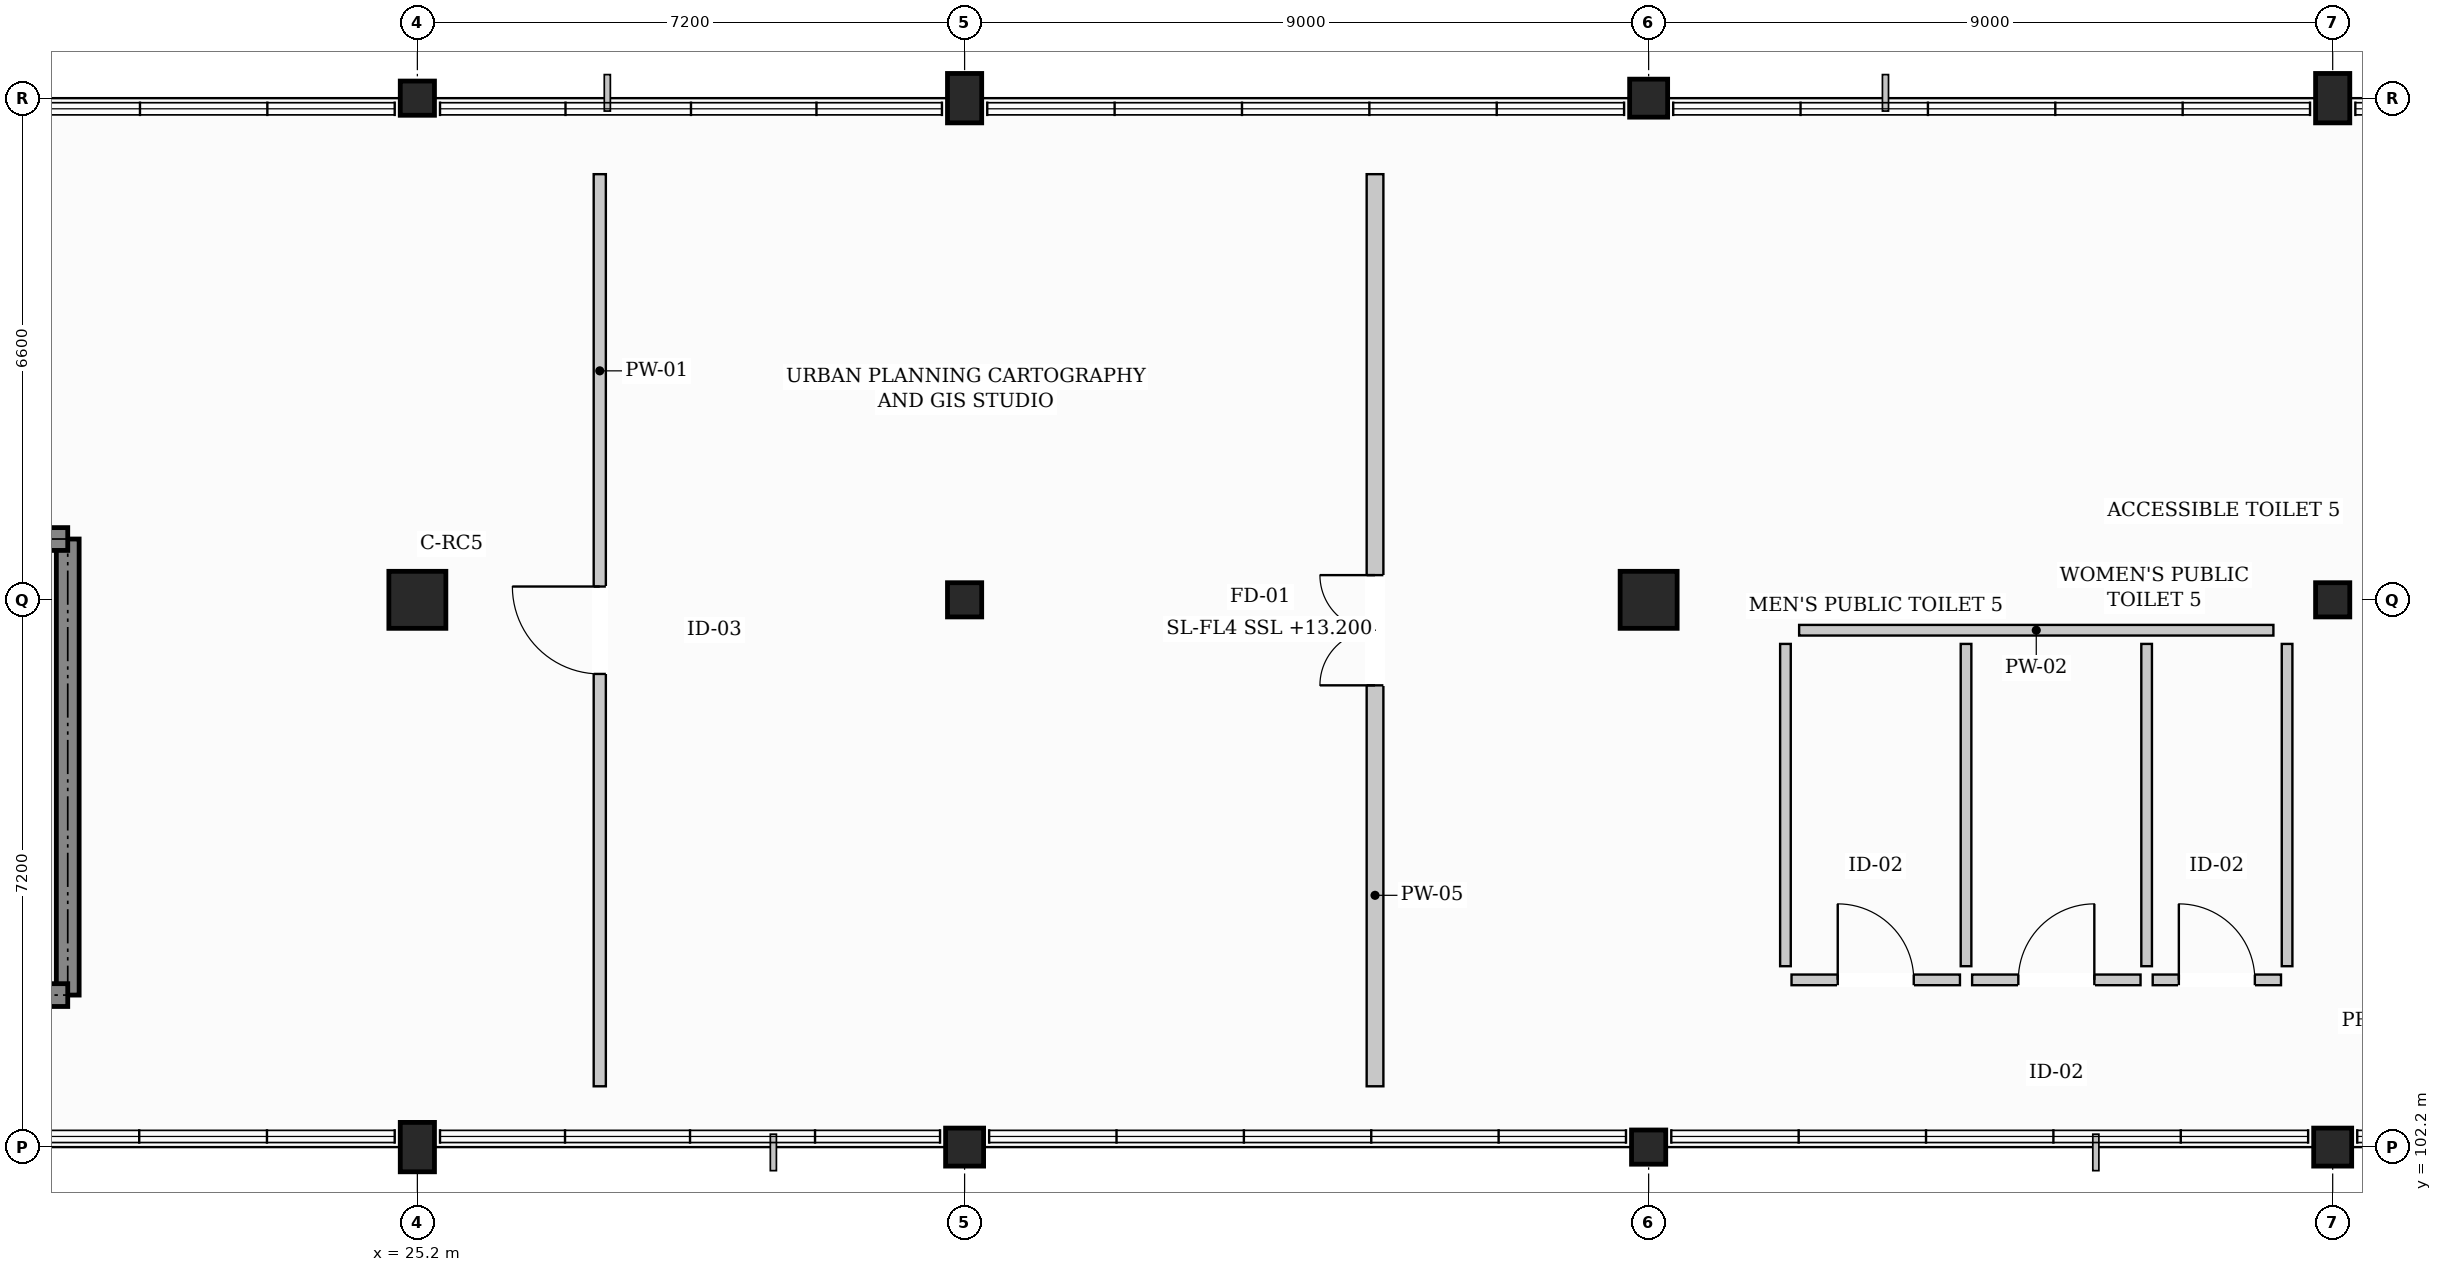
"""IFC4 building model, lengths in metres.
Left out: names, types, materials, properties, quantities, classifications, styles, units other than length and angle.
Written with IfcOpenShell. Run it as: python <this file> out.ifc"""

import sys

from ifc_helpers import new_model, si_unit, direction, frame, frame_2d, origin, origin_2d, place, context, subcontext, project, spatial, rectangle, extrude, element, fill, save


model = new_model("IFC4")
c1 = context("Model", 3, precision=1e-05, world=origin(), true_north=direction((0.0, 1.0)))
c2 = subcontext(c1, "Body", "Model", "MODEL_VIEW")
j1 = project(units=[si_unit("LENGTHUNIT", "METRE"), si_unit("PLANEANGLEUNIT", "RADIAN")], contexts=[c1])
p1 = place(None, origin())
s1 = spatial("IfcSite", under=j1, at=p1, CompositionType="ELEMENT")
p2 = place(p1, origin())
s2 = spatial("IfcBuilding", under=s1, at=p2, CompositionType="ELEMENT")
p3 = place(p2, frame((0.0, 0.0, 13.2)))
s3 = spatial("IfcBuildingStorey", under=s2, at=p3, CompositionType="ELEMENT", Elevation=13.2)
p4 = place(p3, frame((25.2, 102.2, 0.0), z_axis=(0.0, 0.0, 1.0), x_axis=(1.0, 0.0, 0.0)))
e1 = element("IfcColumn", 1, at=p4, inside=s3, PredefinedType="COLUMN", context=c2, shape_type="SweptSolid", body=[
    extrude(rectangle(XDim=0.45, YDim=0.65, at=origin_2d()), origin(), (0.0, 0.0, 1.0), 3.6),
])
p5 = place(p3, frame((25.2, 109.4, 0.0), z_axis=(0.0, 0.0, 1.0), x_axis=(1.0, 0.0, 0.0)))
e2 = element("IfcColumn", 2, at=p5, inside=s3, PredefinedType="COLUMN", context=c2, shape_type="SweptSolid", body=[
    extrude(rectangle(XDim=0.75, YDim=0.75, at=origin_2d()), origin(), (0.0, 0.0, 1.0), 3.6),
])
p6 = place(p3, frame((25.2, 116.0, 0.0), z_axis=(0.0, 0.0, 1.0), x_axis=(1.0, 0.0, 0.0)))
e3 = element("IfcColumn", 3, at=p6, inside=s3, PredefinedType="COLUMN", context=c2, shape_type="SweptSolid", body=[
    extrude(rectangle(XDim=0.45, YDim=0.45, at=origin_2d()), origin(), (0.0, 0.0, 1.0), 3.6),
])
p7 = place(p3, frame((32.4, 102.2, 0.0), z_axis=(0.0, 0.0, 1.0), x_axis=(1.0, 0.0, 0.0)))
e4 = element("IfcColumn", 4, at=p7, inside=s3, PredefinedType="COLUMN", context=c2, shape_type="SweptSolid", body=[
    extrude(rectangle(XDim=0.5, YDim=0.5, at=origin_2d()), origin(), (0.0, 0.0, 1.0), 3.6),
])
p8 = place(p3, frame((32.4, 109.4, 0.0), z_axis=(0.0, 0.0, 1.0), x_axis=(1.0, 0.0, 0.0)))
e5 = element("IfcColumn", 5, at=p8, inside=s3, PredefinedType="COLUMN", context=c2, shape_type="SweptSolid", body=[
    extrude(rectangle(XDim=0.45, YDim=0.45, at=origin_2d()), origin(), (0.0, 0.0, 1.0), 3.6),
])
p9 = place(p3, frame((32.4, 116.0, 0.0), z_axis=(0.0, 0.0, 1.0), x_axis=(1.0, 0.0, 0.0)))
e6 = element("IfcColumn", 6, at=p9, inside=s3, PredefinedType="COLUMN", context=c2, shape_type="SweptSolid", body=[
    extrude(rectangle(XDim=0.45, YDim=0.65, at=origin_2d()), origin(), (0.0, 0.0, 1.0), 3.6),
])
p10 = place(p3, frame((41.4, 102.2, 0.0), z_axis=(0.0, 0.0, 1.0), x_axis=(1.0, 0.0, 0.0)))
e7 = element("IfcColumn", 7, at=p10, inside=s3, PredefinedType="COLUMN", context=c2, shape_type="SweptSolid", body=[
    extrude(rectangle(XDim=0.45, YDim=0.45, at=origin_2d()), origin(), (0.0, 0.0, 1.0), 3.6),
])
p11 = place(p3, frame((41.4, 109.4, 0.0), z_axis=(0.0, 0.0, 1.0), x_axis=(1.0, 0.0, 0.0)))
e8 = element("IfcColumn", 8, at=p11, inside=s3, PredefinedType="COLUMN", context=c2, shape_type="SweptSolid", body=[
    extrude(rectangle(XDim=0.75, YDim=0.75, at=origin_2d()), origin(), (0.0, 0.0, 1.0), 3.6),
])
for number, where, z_axis, x_axis in (
    (9, (41.4, 116.0, 0.0), (0.0, 0.0, 1.0), (1.0, 0.0, 0.0)),
    (10, (50.4, 102.2, 0.0), (0.0, 0.0, 1.0), (1.0, 0.0, 0.0)),
):
    element("IfcColumn", number, at=place(p3, frame(where, z_axis=z_axis, x_axis=x_axis)), inside=s3, PredefinedType="COLUMN", context=c2, shape_type="SweptSolid", body=[
        extrude(rectangle(XDim=0.5, YDim=0.5, at=origin_2d()), origin(), (0.0, 0.0, 1.0), 3.6),
    ])
p12 = place(p3, frame((50.4, 109.4, 0.0), z_axis=(0.0, 0.0, 1.0), x_axis=(1.0, 0.0, 0.0)))
e11 = element("IfcColumn", 11, at=p12, inside=s3, PredefinedType="COLUMN", context=c2, shape_type="SweptSolid", body=[
    extrude(rectangle(XDim=0.45, YDim=0.45, at=origin_2d()), origin(), (0.0, 0.0, 1.0), 3.6),
])
p13 = place(p3, frame((50.4, 116.0, 0.0), z_axis=(0.0, 0.0, 1.0), x_axis=(1.0, 0.0, 0.0)))
e12 = element("IfcColumn", 12, at=p13, inside=s3, PredefinedType="COLUMN", context=c2, shape_type="SweptSolid", body=[
    extrude(rectangle(XDim=0.45, YDim=0.65, at=origin_2d()), origin(), (0.0, 0.0, 1.0), 3.6),
])
p14 = place(p3, frame((20.6, 104.2, 0.0), z_axis=(0.0, 0.0, 1.0), x_axis=(0.0, 1.0, 0.0)))
e13 = element("IfcWall", 13, at=p14, inside=s3, PredefinedType="SHEAR", context=c2, shape_type="SweptSolid", body=[
    extrude(rectangle(XDim=6.0, YDim=0.3, at=frame_2d((3.0, 0.0))), origin(), (0.0, 0.0, 1.0), 3.3),
])
for number, where, z_axis, x_axis in (
    (14, (13.6, 104.2, 0.0), (0.0, 0.0, 1.0), (1.0, 0.0, 0.0)),
    (15, (13.6, 110.2, 0.0), (0.0, 0.0, 1.0), (1.0, 0.0, 0.0)),
):
    element("IfcWall", number, at=place(p3, frame(where, z_axis=z_axis, x_axis=x_axis)), inside=s3, PredefinedType="SHEAR", context=c2, shape_type="SweptSolid", body=[
        extrude(rectangle(XDim=7.0, YDim=0.3, at=frame_2d((3.5, 0.0))), origin(), (0.0, 0.0, 1.0), 3.3),
    ])
p15 = place(p3, frame((43.38, 109.0, 0.0), z_axis=(0.0, 0.0, 1.0), x_axis=(1.0, 0.0, 0.0)))
e16 = element("IfcWall", 16, at=p15, inside=s3, PredefinedType="PARTITIONING", context=c2, shape_type="SweptSolid", body=[
    extrude(rectangle(XDim=6.24, YDim=0.14, at=frame_2d((3.12, 0.0))), origin(), (0.0, 0.0, 1.0), 2.94),
])
for number, where, z_axis, x_axis in (
    (17, (43.2, 104.58, 0.0), (0.0, 0.0, 1.0), (0.0, 1.0, 0.0)),
    (18, (49.8, 104.58, 0.0), (0.0, 0.0, 1.0), (0.0, 1.0, 0.0)),
    (19, (45.576, 104.58, 0.0), (0.0, 0.0, 1.0), (0.0, 1.0, 0.0)),
    (20, (47.952, 104.58, 0.0), (0.0, 0.0, 1.0), (0.0, 1.0, 0.0)),
):
    element("IfcWall", number, at=place(p3, frame(where, z_axis=z_axis, x_axis=x_axis)), inside=s3, PredefinedType="PARTITIONING", context=c2, shape_type="SweptSolid", body=[
        extrude(rectangle(XDim=4.24, YDim=0.14, at=frame_2d((2.12, 0.0))), origin(), (0.0, 0.0, 1.0), 3.3),
    ])
p16 = place(p3, frame((43.28, 104.4, 0.0), z_axis=(0.0, 0.0, 1.0), x_axis=(1.0, 0.0, 0.0)))
e21 = element("IfcWall", 21, at=p16, inside=s3, PredefinedType="PARTITIONING", context=c2, shape_type="SweptSolid", body=[
    extrude(rectangle(XDim=2.216, YDim=0.14, at=frame_2d((1.108, 0.0))), origin(), (0.0, 0.0, 1.0), 3.3),
])
p17 = place(p16, frame((0.608, 0.0, 0.0)))
e22 = element("IfcOpeningElement", 22, at=p17, cuts=e21, PredefinedType="OPENING", context=c2, shape_type="SweptSolid", body=[
    extrude(rectangle(XDim=1.0, YDim=2.15, at=frame_2d((0.5, 1.075))), frame((0.0, 0.08, 0.0), z_axis=(0.0, -1.0, 0.0), x_axis=(1.0, 0.0, 0.0)), (0.0, 0.0, 1.0), 0.16),
])
p18 = place(p3, frame((45.656, 104.4, 0.0), z_axis=(0.0, 0.0, 1.0), x_axis=(1.0, 0.0, 0.0)))
e23 = element("IfcWall", 23, at=p18, inside=s3, PredefinedType="PARTITIONING", context=c2, shape_type="SweptSolid", body=[
    extrude(rectangle(XDim=2.216, YDim=0.14, at=frame_2d((1.108, 0.0))), origin(), (0.0, 0.0, 1.0), 2.94),
])
p19 = place(p18, frame((0.608, 0.0, 0.0)))
e24 = element("IfcOpeningElement", 24, at=p19, cuts=e23, PredefinedType="OPENING", context=c2, shape_type="SweptSolid", body=[
    extrude(rectangle(XDim=1.0, YDim=2.15, at=frame_2d((0.5, 1.075))), frame((0.0, 0.08, 0.0), z_axis=(0.0, -1.0, 0.0), x_axis=(1.0, 0.0, 0.0)), (0.0, 0.0, 1.0), 0.16),
])
p20 = place(p3, frame((48.032, 104.4, 0.0), z_axis=(0.0, 0.0, 1.0), x_axis=(1.0, 0.0, 0.0)))
e25 = element("IfcWall", 25, at=p20, inside=s3, PredefinedType="PARTITIONING", context=c2, shape_type="SweptSolid", body=[
    extrude(rectangle(XDim=1.688, YDim=0.14, at=frame_2d((0.844, 0.0))), origin(), (0.0, 0.0, 1.0), 3.3),
])
p21 = place(p20, frame((0.344, 0.0, 0.0)))
e26 = element("IfcOpeningElement", 26, at=p21, cuts=e25, PredefinedType="OPENING", context=c2, shape_type="SweptSolid", body=[
    extrude(rectangle(XDim=1.0, YDim=2.15, at=frame_2d((0.5, 1.075))), frame((0.0, 0.08, 0.0), z_axis=(0.0, -1.0, 0.0), x_axis=(1.0, 0.0, 0.0)), (0.0, 0.0, 1.0), 0.16),
])
p22 = place(p3, frame((37.8, 103.0, 0.0), z_axis=(0.0, 0.0, 1.0), x_axis=(0.0, 1.0, 0.0)))
e27 = element("IfcWall", 27, at=p22, inside=s3, PredefinedType="PARTITIONING", context=c2, shape_type="SweptSolid", body=[
    extrude(rectangle(XDim=12.0, YDim=0.22, at=frame_2d((6.0, 0.0))), origin(), (0.0, 0.0, 1.0), 2.86),
])
p23 = place(p22, frame((5.275, 0.0, 0.0)))
e28 = element("IfcOpeningElement", 28, at=p23, cuts=e27, PredefinedType="OPENING", context=c2, shape_type="SweptSolid", body=[
    extrude(rectangle(XDim=1.45, YDim=2.2, at=frame_2d((0.725, 1.1))), frame((0.0, 0.12, 0.0), z_axis=(0.0, -1.0, 0.0), x_axis=(1.0, 0.0, 0.0)), (0.0, 0.0, 1.0), 0.24),
])
p24 = place(p3, frame((27.6, 103.0, 0.0), z_axis=(0.0, 0.0, 1.0), x_axis=(0.0, 1.0, 0.0)))
e29 = element("IfcWall", 29, at=p24, inside=s3, PredefinedType="PARTITIONING", context=c2, shape_type="SweptSolid", body=[
    extrude(rectangle(XDim=12.0, YDim=0.16, at=frame_2d((6.0, 0.0))), origin(), (0.0, 0.0, 1.0), 2.9),
])
p25 = place(p24, frame((5.425, 0.0, 0.0)))
e30 = element("IfcOpeningElement", 30, at=p25, cuts=e29, PredefinedType="OPENING", context=c2, shape_type="SweptSolid", body=[
    extrude(rectangle(XDim=1.15, YDim=2.2, at=frame_2d((0.575, 1.1))), frame((0.0, 0.09, 0.0), z_axis=(0.0, -1.0, 0.0), x_axis=(1.0, 0.0, 0.0)), (0.0, 0.0, 1.0), 0.18),
])
p26 = place(p17, origin())
e31 = element("IfcDoor", 31, at=p26, inside=s3, OperationType="SINGLE_SWING_LEFT", PredefinedType="DOOR", context=c2, shape_type="SweptSolid", body=[
    extrude(rectangle(XDim=1.0, YDim=2.15, at=frame_2d((0.5, 1.075))), frame((0.0, 0.025, 0.0), z_axis=(0.0, -1.0, 0.0), x_axis=(1.0, 0.0, 0.0)), (0.0, 0.0, 1.0), 0.05),
])
fill(e22, e31)
p27 = place(p19, origin())
e32 = element("IfcDoor", 32, at=p27, inside=s3, OperationType="SINGLE_SWING_RIGHT", PredefinedType="DOOR", context=c2, shape_type="SweptSolid", body=[
    extrude(rectangle(XDim=1.0, YDim=2.15, at=frame_2d((0.5, 1.075))), frame((0.0, 0.025, 0.0), z_axis=(0.0, -1.0, 0.0), x_axis=(1.0, 0.0, 0.0)), (0.0, 0.0, 1.0), 0.05),
])
fill(e24, e32)
p28 = place(p21, origin())
e33 = element("IfcDoor", 33, at=p28, inside=s3, OperationType="SINGLE_SWING_LEFT", PredefinedType="DOOR", context=c2, shape_type="SweptSolid", body=[
    extrude(rectangle(XDim=1.0, YDim=2.15, at=frame_2d((0.5, 1.075))), frame((0.0, 0.025, 0.0), z_axis=(0.0, -1.0, 0.0), x_axis=(1.0, 0.0, 0.0)), (0.0, 0.0, 1.0), 0.05),
])
fill(e26, e33)
p29 = place(p23, origin())
e34 = element("IfcDoor", 34, at=p29, inside=s3, OperationType="DOUBLE_DOOR_SINGLE_SWING", PredefinedType="DOOR", context=c2, shape_type="SweptSolid", body=[
    extrude(rectangle(XDim=1.45, YDim=2.2, at=frame_2d((0.725, 1.1))), frame((0.0, 0.025, 0.0), z_axis=(0.0, -1.0, 0.0), x_axis=(1.0, 0.0, 0.0)), (0.0, 0.0, 1.0), 0.05),
])
fill(e28, e34)
p30 = place(p25, origin())
e35 = element("IfcDoor", 35, at=p30, inside=s3, OperationType="SINGLE_SWING_RIGHT", PredefinedType="DOOR", context=c2, shape_type="SweptSolid", body=[
    extrude(rectangle(XDim=1.15, YDim=2.2, at=frame_2d((0.575, 1.1))), frame((0.0, 0.025, 0.0), z_axis=(0.0, -1.0, 0.0), x_axis=(1.0, 0.0, 0.0)), (0.0, 0.0, 1.0), 0.05),
])
fill(e30, e35)
save(model, sys.argv[1])
